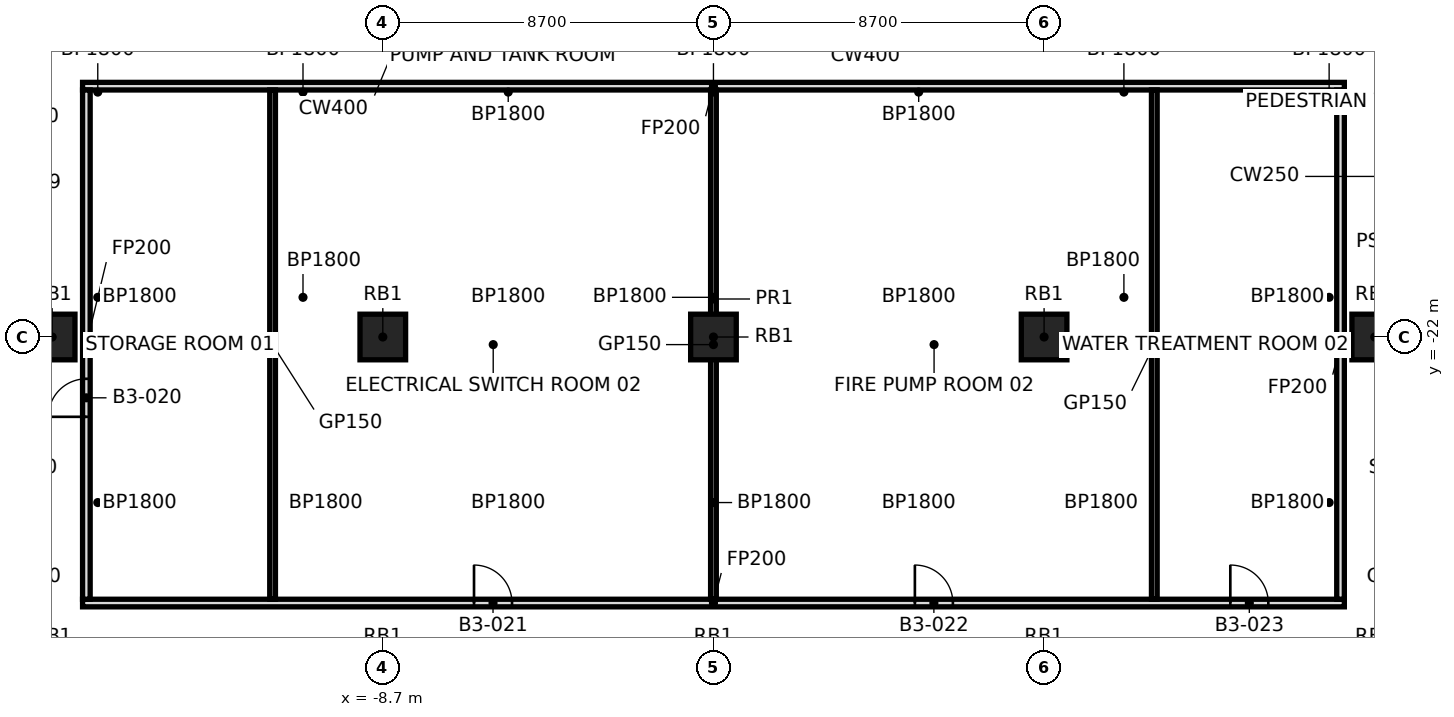
"""IFC4 building model, lengths in metres.
Left out: names, types, materials, properties, quantities, classifications, styles, units other than length and angle.
Written with IfcOpenShell. Run it as: python <this file> out.ifc"""

import sys

from ifc_helpers import new_model, si_unit, direction, frame, frame_2d, origin, origin_2d, place, context, subcontext, project, spatial, rectangle, extrude, element, fill, save


model = new_model("IFC4")
c1 = context("Model", 3, precision=1e-05, world=origin(), true_north=direction((0.0, 1.0)))
c2 = subcontext(c1, "Body", "Model", "MODEL_VIEW")
j1 = project(units=[si_unit("LENGTHUNIT", "METRE"), si_unit("PLANEANGLEUNIT", "RADIAN")], contexts=[c1])
p1 = place(None, origin())
s1 = spatial("IfcSite", under=j1, at=p1, CompositionType="ELEMENT")
p2 = place(p1, origin())
s2 = spatial("IfcBuilding", under=s1, at=p2, CompositionType="ELEMENT")
p3 = place(p2, frame((0.0, 0.0, -15.0)))
s3 = spatial("IfcBuildingStorey", under=s2, at=p3, CompositionType="ELEMENT", Elevation=-15.0)
for number, where, z_axis, x_axis in (
    (1, (-17.4, -22.0, 0.0), (0.0, 0.0, 1.0), (1.0, 0.0, 0.0)),
    (2, (-8.7, -22.0, 0.0), (0.0, 0.0, 1.0), (1.0, 0.0, 0.0)),
    (3, (0.0, -22.0, 0.0), (0.0, 0.0, 1.0), (1.0, 0.0, 0.0)),
    (4, (8.7, -22.0, 0.0), (0.0, 0.0, 1.0), (1.0, 0.0, 0.0)),
    (5, (17.4, -22.0, 0.0), (0.0, 0.0, 1.0), (1.0, 0.0, 0.0)),
):
    element("IfcColumn", number, at=place(p3, frame(where, z_axis=z_axis, x_axis=x_axis)), inside=s3, PredefinedType="COLUMN", context=c2, shape_type="SweptSolid", body=[
        extrude(rectangle(XDim=1.2, YDim=1.2, at=origin_2d()), origin(), (0.0, 0.0, 1.0), 5.0),
    ])
p4 = place(p3, frame((-16.6, -29.0, 0.0), z_axis=(0.0, 0.0, 1.0), x_axis=(1.0, 0.0, 0.0)))
e6 = element("IfcWall", 6, at=p4, inside=s3, PredefinedType="PARTITIONING", context=c2, shape_type="SweptSolid", body=[
    extrude(rectangle(XDim=33.2, YDim=0.2, at=frame_2d((16.6, 0.0))), origin(), (0.0, 0.0, 1.0), 4.7),
])
p5 = place(p4, frame((10.3, 0.0, 0.0)))
e7 = element("IfcOpeningElement", 7, at=p5, cuts=e6, PredefinedType="OPENING", context=c2, shape_type="SweptSolid", body=[
    extrude(rectangle(XDim=1.0, YDim=2.1, at=frame_2d((0.5, 1.05))), frame((0.0, 0.112, 0.0), z_axis=(0.0, -1.0, 0.0), x_axis=(1.0, 0.0, 0.0)), (0.0, 0.0, 1.0), 0.224),
])
p6 = place(p4, frame((21.9, 0.0, 0.0)))
e8 = element("IfcOpeningElement", 8, at=p6, cuts=e6, PredefinedType="OPENING", context=c2, shape_type="SweptSolid", body=[
    extrude(rectangle(XDim=1.0, YDim=2.1, at=frame_2d((0.5, 1.05))), frame((0.0, 0.112, 0.0), z_axis=(0.0, -1.0, 0.0), x_axis=(1.0, 0.0, 0.0)), (0.0, 0.0, 1.0), 0.224),
])
p7 = place(p4, frame((30.2, 0.0, 0.0)))
e9 = element("IfcOpeningElement", 9, at=p7, cuts=e6, PredefinedType="OPENING", context=c2, shape_type="SweptSolid", body=[
    extrude(rectangle(XDim=1.0, YDim=2.1, at=frame_2d((0.5, 1.05))), frame((0.0, 0.112, 0.0), z_axis=(0.0, -1.0, 0.0), x_axis=(1.0, 0.0, 0.0)), (0.0, 0.0, 1.0), 0.224),
])
p8 = place(p3, frame((-16.6, -15.4, 0.0), z_axis=(0.0, 0.0, 1.0), x_axis=(1.0, 0.0, 0.0)))
e10 = element("IfcWall", 10, at=p8, inside=s3, PredefinedType="PARTITIONING", context=c2, shape_type="SweptSolid", body=[
    extrude(rectangle(XDim=33.2, YDim=0.2, at=frame_2d((16.6, 0.0))), origin(), (0.0, 0.0, 1.0), 4.7),
])
p9 = place(p3, frame((-16.5, -28.9, 0.0), z_axis=(0.0, 0.0, 1.0), x_axis=(0.0, 1.0, 0.0)))
e11 = element("IfcWall", 11, at=p9, inside=s3, PredefinedType="PARTITIONING", context=c2, shape_type="SweptSolid", body=[
    extrude(rectangle(XDim=13.4, YDim=0.2, at=frame_2d((6.7, 0.0))), origin(), (0.0, 0.0, 1.0), 4.7),
])
p10 = place(p9, frame((4.8, 0.0, 0.0)))
e12 = element("IfcOpeningElement", 12, at=p10, cuts=e11, PredefinedType="OPENING", context=c2, shape_type="SweptSolid", body=[
    extrude(rectangle(XDim=1.0, YDim=2.1, at=frame_2d((0.5, 1.05))), frame((0.0, 0.112, 0.0), z_axis=(0.0, -1.0, 0.0), x_axis=(1.0, 0.0, 0.0)), (0.0, 0.0, 1.0), 0.224),
])
for number, where, z_axis, x_axis in (
    (13, (-11.6, -28.9, 0.0), (0.0, 0.0, 1.0), (0.0, 1.0, 0.0)),
    (14, (0.0, -28.9, 0.0), (0.0, 0.0, 1.0), (0.0, 1.0, 0.0)),
    (15, (11.6, -28.9, 0.0), (0.0, 0.0, 1.0), (0.0, 1.0, 0.0)),
):
    element("IfcWall", number, at=place(p3, frame(where, z_axis=z_axis, x_axis=x_axis)), inside=s3, PredefinedType="PARTITIONING", context=c2, shape_type="SweptSolid", body=[
        extrude(rectangle(XDim=13.4, YDim=0.15, at=frame_2d((6.7, 0.0))), origin(), (0.0, 0.0, 1.0), 4.7),
    ])
p11 = place(p3, frame((16.5, -28.9, 0.0), z_axis=(0.0, 0.0, 1.0), x_axis=(0.0, 1.0, 0.0)))
e16 = element("IfcWall", 16, at=p11, inside=s3, PredefinedType="PARTITIONING", context=c2, shape_type="SweptSolid", body=[
    extrude(rectangle(XDim=13.4, YDim=0.2, at=frame_2d((6.7, 0.0))), origin(), (0.0, 0.0, 1.0), 4.7),
])
p12 = place(p10, frame((1.0, 0.0, 0.0), z_axis=(0.0, 0.0, 1.0), x_axis=(-1.0, 0.0, 0.0)))
e17 = element("IfcDoor", 17, at=p12, inside=s3, OperationType="SINGLE_SWING_RIGHT", PredefinedType="DOOR", context=c2, shape_type="SweptSolid", body=[
    extrude(rectangle(XDim=1.0, YDim=2.1, at=frame_2d((0.5, 1.05))), frame((0.0, 0.025, 0.0), z_axis=(0.0, -1.0, 0.0), x_axis=(1.0, 0.0, 0.0)), (0.0, 0.0, 1.0), 0.05),
])
fill(e12, e17)
p13 = place(p5, origin())
e18 = element("IfcDoor", 18, at=p13, inside=s3, OperationType="SINGLE_SWING_RIGHT", PredefinedType="DOOR", context=c2, shape_type="SweptSolid", body=[
    extrude(rectangle(XDim=1.0, YDim=2.1, at=frame_2d((0.5, 1.05))), frame((0.0, 0.025, 0.0), z_axis=(0.0, -1.0, 0.0), x_axis=(1.0, 0.0, 0.0)), (0.0, 0.0, 1.0), 0.05),
])
fill(e7, e18)
p14 = place(p6, origin())
e19 = element("IfcDoor", 19, at=p14, inside=s3, OperationType="SINGLE_SWING_LEFT", PredefinedType="DOOR", context=c2, shape_type="SweptSolid", body=[
    extrude(rectangle(XDim=1.0, YDim=2.1, at=frame_2d((0.5, 1.05))), frame((0.0, 0.025, 0.0), z_axis=(0.0, -1.0, 0.0), x_axis=(1.0, 0.0, 0.0)), (0.0, 0.0, 1.0), 0.05),
])
fill(e8, e19)
p15 = place(p7, origin())
e20 = element("IfcDoor", 20, at=p15, inside=s3, OperationType="SINGLE_SWING_LEFT", PredefinedType="DOOR", context=c2, shape_type="SweptSolid", body=[
    extrude(rectangle(XDim=1.0, YDim=2.1, at=frame_2d((0.5, 1.05))), frame((0.0, 0.025, 0.0), z_axis=(0.0, -1.0, 0.0), x_axis=(1.0, 0.0, 0.0)), (0.0, 0.0, 1.0), 0.05),
])
fill(e9, e20)
save(model, sys.argv[1])
